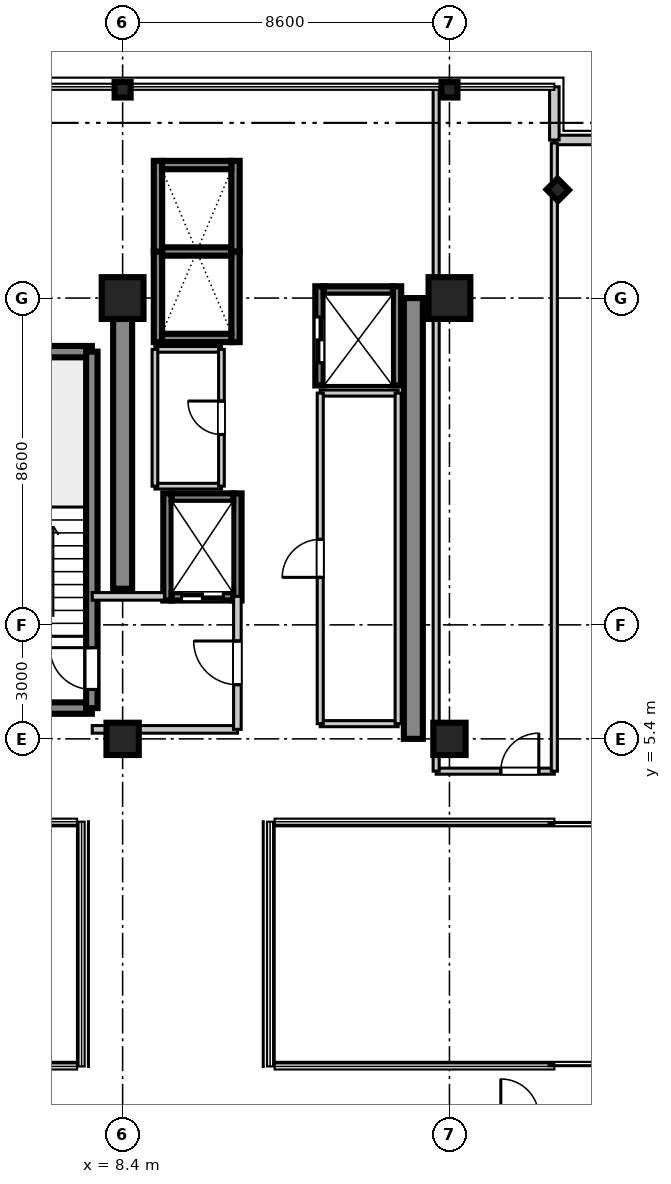
"""IFC4 building model, lengths in metres.
Left out: names, types, materials, properties, quantities, classifications, styles, units other than length and angle.
Written with IfcOpenShell. Run it as: python <this file> out.ifc"""

import sys

from ifc_helpers import new_model, si_unit, direction, frame, frame_2d, origin, origin_2d, place, context, subcontext, project, spatial, rectangle, i_section, extrude, source, transform, mapped, element, fill, save


model = new_model("IFC4")
c1 = context("Model", 3, precision=1e-05, world=origin(), true_north=direction((0.0, 1.0)))
c2 = subcontext(c1, "Body", "Model", "MODEL_VIEW")
j1 = project(units=[si_unit("LENGTHUNIT", "METRE"), si_unit("PLANEANGLEUNIT", "RADIAN")], contexts=[c1])
p1 = place(None, origin())
s1 = spatial("IfcSite", under=j1, at=p1, CompositionType="ELEMENT")
p2 = place(p1, origin())
s2 = spatial("IfcBuilding", under=s1, at=p2, CompositionType="ELEMENT")
p3 = place(p2, frame((0.0, 0.0, 170.9)))
s3 = spatial("IfcBuildingStorey", under=s2, at=p3, CompositionType="ELEMENT", Elevation=170.9)
m1 = source(origin(), c2, "Body", "SweptSolid", [
    extrude(rectangle(XDim=0.85, YDim=0.85, at=origin_2d()), origin(), (0.0, 0.0, 1.0), 3.605),
])
p4 = place(p3, frame((8.4, 5.4, 0.0), z_axis=(0.0, 0.0, 1.0), x_axis=(1.0, 0.0, 0.0)))
e1 = element("IfcColumn", 1, at=p4, inside=s3, PredefinedType="PILASTER", context=c2, shape_type="MappedRepresentation", body=[
    mapped(m1, transform((0.0, 0.0, 0.0), scale=1.0)),
])
m2 = source(origin(), c2, "Body", "SweptSolid", [
    extrude(rectangle(XDim=1.1, YDim=1.1, at=origin_2d()), origin(), (0.0, 0.0, 1.0), 3.605),
])
p5 = place(p3, frame((8.4, 17.0, 0.0), z_axis=(0.0, 0.0, 1.0), x_axis=(1.0, 0.0, 0.0)))
e2 = element("IfcColumn", 2, at=p5, inside=s3, PredefinedType="COLUMN", context=c2, shape_type="MappedRepresentation", body=[
    mapped(m2, transform((0.0, 0.0, 0.0), scale=1.0)),
])
p6 = place(p3, frame((17.0, 5.4, 0.0), z_axis=(0.0, 0.0, 1.0), x_axis=(1.0, 0.0, 0.0)))
e3 = element("IfcColumn", 3, at=p6, inside=s3, PredefinedType="PILASTER", context=c2, shape_type="MappedRepresentation", body=[
    mapped(m1, transform((0.0, 0.0, 0.0), scale=1.0)),
])
p7 = place(p3, frame((17.0, 17.0, 0.0), z_axis=(0.0, 0.0, 1.0), x_axis=(1.0, 0.0, 0.0)))
e4 = element("IfcColumn", 4, at=p7, inside=s3, PredefinedType="COLUMN", context=c2, shape_type="MappedRepresentation", body=[
    mapped(m2, transform((0.0, 0.0, 0.0), scale=1.0)),
])
m3 = source(origin(), c2, "Body", "SweptSolid", [
    extrude(i_section(OverallWidth=0.406, OverallDepth=0.422, WebThickness=0.019, FlangeThickness=0.03, at=origin_2d()), origin(), (0.0, 0.0, 1.0), 3.605),
])
for number, where, z_axis, x_axis in (
    (5, (8.4, 22.48, 0.0), (0.0, 0.0, 1.0), (0.0, 1.0, 0.0)),
    (6, (17.0, 22.48, 0.0), (0.0, 0.0, 1.0), (0.0, 1.0, 0.0)),
    (7, (19.85, 19.85, 0.0), (0.0, 0.0, 1.0), (0.707, 0.707, 0.0)),
):
    element("IfcColumn", number, at=place(p3, frame(where, z_axis=z_axis, x_axis=x_axis)), inside=s3, PredefinedType="COLUMN", context=c2, shape_type="MappedRepresentation", body=[
        mapped(m3, transform((0.0, 0.0, 0.0), scale=1.0)),
    ])
m4 = source(origin(), c2, "Body", "SweptSolid", [
    extrude(rectangle(XDim=7.65, YDim=0.5, at=frame_2d((3.825, 0.0))), origin(), (0.0, 0.0, 1.0), 3.39),
])
p8 = place(p3, frame((8.4, 9.35, 0.0), z_axis=(0.0, 0.0, 1.0), x_axis=(0.0, 1.0, 0.0)))
e8 = element("IfcWall", 8, at=p8, inside=s3, PredefinedType="SHEAR", context=c2, shape_type="MappedRepresentation", body=[
    mapped(m4, transform((0.0, 0.0, 0.0), scale=1.0)),
])
m5 = source(origin(), c2, "Body", "SweptSolid", [
    extrude(rectangle(XDim=11.6, YDim=0.5, at=frame_2d((5.8, 0.0))), origin(), (0.0, 0.0, 1.0), 3.39),
])
p9 = place(p3, frame((16.05, 5.4, 0.0), z_axis=(0.0, 0.0, 1.0), x_axis=(0.0, 1.0, 0.0)))
e9 = element("IfcWall", 9, at=p9, inside=s3, PredefinedType="SHEAR", context=c2, shape_type="MappedRepresentation", body=[
    mapped(m5, transform((0.0, 0.0, 0.0), scale=1.0)),
])
m6 = source(origin(), c2, "Body", "SweptSolid", [
    extrude(rectangle(XDim=3.98, YDim=0.3, at=frame_2d((1.99, 0.0))), origin(), (0.0, 0.0, 1.0), 3.39),
])
for number, where, z_axis, x_axis in (
    (10, (3.61, 6.21, 0.0), (0.0, 0.0, 1.0), (1.0, 0.0, 0.0)),
    (11, (3.61, 15.59, 0.0), (0.0, 0.0, 1.0), (1.0, 0.0, 0.0)),
):
    element("IfcWall", number, at=place(p3, frame(where, z_axis=z_axis, x_axis=x_axis)), inside=s3, PredefinedType="SHEAR", context=c2, shape_type="MappedRepresentation", body=[
        mapped(m6, transform((0.0, 0.0, 0.0), scale=1.0)),
    ])
m7 = source(origin(), c2, "Body", "SweptSolid", [
    extrude(rectangle(XDim=9.38, YDim=0.3, at=frame_2d((4.69, 0.0))), origin(), (0.0, 0.0, 1.0), 3.39),
])
p10 = place(p3, frame((7.59, 6.21, 0.0), z_axis=(0.0, 0.0, 1.0), x_axis=(0.0, 1.0, 0.0)))
e12 = element("IfcWall", 12, at=p10, inside=s3, PredefinedType="SHEAR", context=c2, shape_type="MappedRepresentation", body=[
    mapped(m7, transform((0.0, 0.0, 0.0), scale=1.0)),
])
p11 = place(p10, frame((0.49, 0.0, 0.0)))
e13 = element("IfcOpeningElement", 13, at=p11, cuts=e12, PredefinedType="OPENING", context=c2, shape_type="SweptSolid", body=[
    extrude(rectangle(XDim=1.1, YDim=2.15, at=frame_2d((0.55, 1.075))), frame((0.0, 0.16, 0.0), z_axis=(0.0, -1.0, 0.0), x_axis=(1.0, 0.0, 0.0)), (0.0, 0.0, 1.0), 0.32),
])
m8 = source(origin(), c2, "Body", "SweptSolid", [
    extrude(rectangle(XDim=2.385, YDim=0.22, at=frame_2d((1.192, 0.0))), origin(), (0.0, 0.0, 1.0), 3.39),
])
for number, where, z_axis, x_axis in (
    (14, (9.33, 15.84, 0.0), (0.0, 0.0, 1.0), (0.0, 1.0, 0.0)),
    (15, (11.37, 15.84, 0.0), (0.0, 0.0, 1.0), (0.0, 1.0, 0.0)),
):
    element("IfcWall", number, at=place(p3, frame(where, z_axis=z_axis, x_axis=x_axis)), inside=s3, PredefinedType="SHEAR", context=c2, shape_type="MappedRepresentation", body=[
        mapped(m8, transform((0.0, 0.0, 0.0), scale=1.0)),
    ])
m9 = source(origin(), c2, "Body", "SweptSolid", [
    extrude(rectangle(XDim=1.82, YDim=0.22, at=frame_2d((0.91, 0.0))), origin(), (0.0, 0.0, 1.0), 3.39),
])
p12 = place(p3, frame((9.44, 15.95, 0.0), z_axis=(0.0, 0.0, 1.0), x_axis=(1.0, 0.0, 0.0)))
e16 = element("IfcWall", 16, at=p12, inside=s3, PredefinedType="SHEAR", context=c2, shape_type="MappedRepresentation", body=[
    mapped(m9, transform((0.0, 0.0, 0.0), scale=1.0)),
])
m10 = source(origin(), c2, "Body", "SweptSolid", [
    extrude(rectangle(XDim=1.82, YDim=0.22, at=frame_2d((0.91, 0.0))), origin(), (0.0, 0.0, 1.0), 3.65),
])
p13 = place(p3, frame((9.44, 18.225, 0.0), z_axis=(0.0, 0.0, 1.0), x_axis=(1.0, 0.0, 0.0)))
e17 = element("IfcWall", 17, at=p13, inside=s3, PredefinedType="SHEAR", context=c2, shape_type="MappedRepresentation", body=[
    mapped(m10, transform((0.0, 0.0, 0.0), scale=1.0)),
])
for number, where, z_axis, x_axis in (
    (18, (9.33, 18.225, 0.0), (0.0, 0.0, 1.0), (0.0, 1.0, 0.0)),
    (19, (11.37, 18.225, 0.0), (0.0, 0.0, 1.0), (0.0, 1.0, 0.0)),
):
    element("IfcWall", number, at=place(p3, frame(where, z_axis=z_axis, x_axis=x_axis)), inside=s3, PredefinedType="SHEAR", context=c2, shape_type="MappedRepresentation", body=[
        mapped(m8, transform((0.0, 0.0, 0.0), scale=1.0)),
    ])
p14 = place(p3, frame((9.44, 20.5, 0.0), z_axis=(0.0, 0.0, 1.0), x_axis=(1.0, 0.0, 0.0)))
e20 = element("IfcWall", 20, at=p14, inside=s3, PredefinedType="SHEAR", context=c2, shape_type="MappedRepresentation", body=[
    mapped(m9, transform((0.0, 0.0, 0.0), scale=1.0)),
])
m11 = source(origin(), c2, "Body", "SweptSolid", [
    extrude(rectangle(XDim=2.82, YDim=0.22, at=frame_2d((1.41, 0.0))), origin(), (0.0, 0.0, 1.0), 3.39),
])
for number, where, z_axis, x_axis in (
    (21, (9.58, 9.04, 0.0), (0.0, 0.0, 1.0), (0.0, 1.0, 0.0)),
    (22, (11.42, 9.04, 0.0), (0.0, 0.0, 1.0), (0.0, 1.0, 0.0)),
):
    element("IfcWall", number, at=place(p3, frame(where, z_axis=z_axis, x_axis=x_axis)), inside=s3, PredefinedType="SHEAR", context=c2, shape_type="MappedRepresentation", body=[
        mapped(m11, transform((0.0, 0.0, 0.0), scale=1.0)),
    ])
m12 = source(origin(), c2, "Body", "SweptSolid", [
    extrude(rectangle(XDim=1.62, YDim=0.22, at=frame_2d((0.81, 0.0))), origin(), (0.0, 0.0, 1.0), 3.39),
])
p15 = place(p3, frame((9.69, 9.15, 0.0), z_axis=(0.0, 0.0, 1.0), x_axis=(1.0, 0.0, 0.0)))
e23 = element("IfcWall", 23, at=p15, inside=s3, PredefinedType="SHEAR", context=c2, shape_type="MappedRepresentation", body=[
    mapped(m12, transform((0.0, 0.0, 0.0), scale=1.0)),
])
p16 = place(p15, frame((0.26, 0.0, 0.0)))
e24 = element("IfcOpeningElement", 24, at=p16, cuts=e23, PredefinedType="OPENING", context=c2, shape_type="SweptSolid", body=[
    extrude(rectangle(XDim=1.1, YDim=2.2, at=frame_2d((0.55, 1.1))), frame((0.0, 0.12, 0.0), z_axis=(0.0, -1.0, 0.0), x_axis=(1.0, 0.0, 0.0)), (0.0, 0.0, 1.0), 0.24),
])
p17 = place(p3, frame((9.69, 11.75, 0.0), z_axis=(0.0, 0.0, 1.0), x_axis=(1.0, 0.0, 0.0)))
e25 = element("IfcWall", 25, at=p17, inside=s3, PredefinedType="SHEAR", context=c2, shape_type="MappedRepresentation", body=[
    mapped(m12, transform((0.0, 0.0, 0.0), scale=1.0)),
])
m13 = source(origin(), c2, "Body", "SweptSolid", [
    extrude(rectangle(XDim=2.61, YDim=0.22, at=frame_2d((1.305, 0.0))), origin(), (0.0, 0.0, 1.0), 3.39),
])
p18 = place(p3, frame((13.58, 14.7, 0.0), z_axis=(0.0, 0.0, 1.0), x_axis=(0.0, 1.0, 0.0)))
e26 = element("IfcWall", 26, at=p18, inside=s3, PredefinedType="SHEAR", context=c2, shape_type="MappedRepresentation", body=[
    mapped(m13, transform((0.0, 0.0, 0.0), scale=1.0)),
])
p19 = place(p18, frame((0.6, 0.0, 0.0)))
e27 = element("IfcOpeningElement", 27, at=p19, cuts=e26, PredefinedType="OPENING", context=c2, shape_type="SweptSolid", body=[
    extrude(rectangle(XDim=1.2, YDim=2.2, at=frame_2d((0.6, 1.1))), frame((0.0, 0.12, 0.0), z_axis=(0.0, -1.0, 0.0), x_axis=(1.0, 0.0, 0.0)), (0.0, 0.0, 1.0), 0.24),
])
p20 = place(p3, frame((15.62, 14.7, 0.0), z_axis=(0.0, 0.0, 1.0), x_axis=(0.0, 1.0, 0.0)))
e28 = element("IfcWall", 28, at=p20, inside=s3, PredefinedType="SHEAR", context=c2, shape_type="MappedRepresentation", body=[
    mapped(m13, transform((0.0, 0.0, 0.0), scale=1.0)),
])
p21 = place(p3, frame((13.69, 17.2, 0.0), z_axis=(0.0, 0.0, 1.0), x_axis=(1.0, 0.0, 0.0)))
e29 = element("IfcWall", 29, at=p21, inside=s3, PredefinedType="SHEAR", context=c2, shape_type="MappedRepresentation", body=[
    mapped(m9, transform((0.0, 0.0, 0.0), scale=1.0)),
])
m14 = source(origin(), c2, "Body", "SweptSolid", [
    extrude(rectangle(XDim=1.4, YDim=0.25, at=frame_2d((0.7, 0.0))), origin(), (0.0, 0.0, 1.0), 3.39),
])
p22 = place(p3, frame((19.76, 21.16, 0.0), z_axis=(0.0, 0.0, 1.0), x_axis=(1.0, 0.0, 0.0)))
e30 = element("IfcWall", 30, at=p22, inside=s3, PredefinedType="STANDARD", context=c2, shape_type="MappedRepresentation", body=[
    mapped(m14, transform((0.0, 0.0, 0.0), scale=1.0)),
])
m15 = source(origin(), c2, "Body", "SweptSolid", [
    extrude(rectangle(XDim=1.4, YDim=0.25, at=frame_2d((0.7, 0.0))), origin(), (0.0, 0.0, 1.0), 3.39),
])
p23 = place(p3, frame((19.76, 21.16, 0.0), z_axis=(0.0, 0.0, 1.0), x_axis=(0.0, 1.0, 0.0)))
e31 = element("IfcWall", 31, at=p23, inside=s3, PredefinedType="STANDARD", context=c2, shape_type="MappedRepresentation", body=[
    mapped(m15, transform((0.0, 0.0, 0.0), scale=1.0)),
])
m16 = source(origin(), c2, "Body", "SweptSolid", [
    extrude(rectangle(XDim=3.82, YDim=0.2, at=frame_2d((1.91, 0.0))), origin(), (0.0, 0.0, 1.0), 2.73),
])
p24 = place(p3, frame((7.6, 5.65, 0.0), z_axis=(0.0, 0.0, 1.0), x_axis=(1.0, 0.0, 0.0)))
e32 = element("IfcWall", 32, at=p24, inside=s3, PredefinedType="PARTITIONING", context=c2, shape_type="MappedRepresentation", body=[
    mapped(m16, transform((0.0, 0.0, 0.0), scale=1.0)),
])
m17 = source(origin(), c2, "Body", "SweptSolid", [
    extrude(rectangle(XDim=1.9, YDim=0.2, at=frame_2d((0.95, 0.0))), origin(), (0.0, 0.0, 1.0), 2.73),
])
p25 = place(p3, frame((7.6, 9.15, 0.0), z_axis=(0.0, 0.0, 1.0), x_axis=(1.0, 0.0, 0.0)))
e33 = element("IfcWall", 33, at=p25, inside=s3, PredefinedType="PARTITIONING", context=c2, shape_type="MappedRepresentation", body=[
    mapped(m17, transform((0.0, 0.0, 0.0), scale=1.0)),
])
m18 = source(origin(), c2, "Body", "SweptSolid", [
    extrude(rectangle(XDim=3.5, YDim=0.2, at=frame_2d((1.75, 0.0))), origin(), (0.0, 0.0, 1.0), 2.73),
])
p26 = place(p3, frame((11.42, 5.65, 0.0), z_axis=(0.0, 0.0, 1.0), x_axis=(0.0, 1.0, 0.0)))
e34 = element("IfcWall", 34, at=p26, inside=s3, PredefinedType="PARTITIONING", context=c2, shape_type="MappedRepresentation", body=[
    mapped(m18, transform((0.0, 0.0, 0.0), scale=1.0)),
])
p27 = place(p26, frame((1.175, 0.0, 0.0)))
e35 = element("IfcOpeningElement", 35, at=p27, cuts=e34, PredefinedType="OPENING", context=c2, shape_type="SweptSolid", body=[
    extrude(rectangle(XDim=1.15, YDim=2.15, at=frame_2d((0.575, 1.075))), frame((0.0, 0.11, 0.0), z_axis=(0.0, -1.0, 0.0), x_axis=(1.0, 0.0, 0.0)), (0.0, 0.0, 1.0), 0.22),
])
m19 = source(origin(), c2, "Body", "SweptSolid", [
    extrude(rectangle(XDim=1.75, YDim=0.15, at=frame_2d((0.875, 0.0))), origin(), (0.0, 0.0, 1.0), 2.73),
])
for number, where, z_axis, x_axis in (
    (36, (9.25, 12.05, 0.0), (0.0, 0.0, 1.0), (1.0, 0.0, 0.0)),
    (37, (9.25, 15.65, 0.0), (0.0, 0.0, 1.0), (1.0, 0.0, 0.0)),
):
    element("IfcWall", number, at=place(p3, frame(where, z_axis=z_axis, x_axis=x_axis)), inside=s3, PredefinedType="PARTITIONING", context=c2, shape_type="MappedRepresentation", body=[
        mapped(m19, transform((0.0, 0.0, 0.0), scale=1.0)),
    ])
m20 = source(origin(), c2, "Body", "SweptSolid", [
    extrude(rectangle(XDim=3.6, YDim=0.15, at=frame_2d((1.8, 0.0))), origin(), (0.0, 0.0, 1.0), 2.73),
])
p28 = place(p3, frame((9.25, 12.05, 0.0), z_axis=(0.0, 0.0, 1.0), x_axis=(0.0, 1.0, 0.0)))
e38 = element("IfcWall", 38, at=p28, inside=s3, PredefinedType="PARTITIONING", context=c2, shape_type="MappedRepresentation", body=[
    mapped(m20, transform((0.0, 0.0, 0.0), scale=1.0)),
])
p29 = place(p3, frame((11.0, 12.05, 0.0), z_axis=(0.0, 0.0, 1.0), x_axis=(0.0, 1.0, 0.0)))
e39 = element("IfcWall", 39, at=p29, inside=s3, PredefinedType="PARTITIONING", context=c2, shape_type="MappedRepresentation", body=[
    mapped(m20, transform((0.0, 0.0, 0.0), scale=1.0)),
])
p30 = place(p29, frame((1.36, 0.0, 0.0)))
e40 = element("IfcOpeningElement", 40, at=p30, cuts=e39, PredefinedType="OPENING", context=c2, shape_type="SweptSolid", body=[
    extrude(rectangle(XDim=0.88, YDim=2.1, at=frame_2d((0.44, 1.05))), frame((0.0, 0.085, 0.0), z_axis=(0.0, -1.0, 0.0), x_axis=(1.0, 0.0, 0.0)), (0.0, 0.0, 1.0), 0.17),
])
m21 = source(origin(), c2, "Body", "SweptSolid", [
    extrude(rectangle(XDim=2.05, YDim=0.16, at=frame_2d((1.025, 0.0))), origin(), (0.0, 0.0, 1.0), 2.73),
])
for number, where, z_axis, x_axis in (
    (41, (13.6, 5.8, 0.0), (0.0, 0.0, 1.0), (1.0, 0.0, 0.0)),
    (42, (13.6, 14.5, 0.0), (0.0, 0.0, 1.0), (1.0, 0.0, 0.0)),
):
    element("IfcWall", number, at=place(p3, frame(where, z_axis=z_axis, x_axis=x_axis)), inside=s3, PredefinedType="PARTITIONING", context=c2, shape_type="MappedRepresentation", body=[
        mapped(m21, transform((0.0, 0.0, 0.0), scale=1.0)),
    ])
m22 = source(origin(), c2, "Body", "SweptSolid", [
    extrude(rectangle(XDim=8.7, YDim=0.16, at=frame_2d((4.35, 0.0))), origin(), (0.0, 0.0, 1.0), 2.73),
])
p31 = place(p3, frame((13.6, 5.8, 0.0), z_axis=(0.0, 0.0, 1.0), x_axis=(0.0, 1.0, 0.0)))
e43 = element("IfcWall", 43, at=p31, inside=s3, PredefinedType="PARTITIONING", context=c2, shape_type="MappedRepresentation", body=[
    mapped(m22, transform((0.0, 0.0, 0.0), scale=1.0)),
])
p32 = place(p31, frame((3.85, 0.0, 0.0)))
e44 = element("IfcOpeningElement", 44, at=p32, cuts=e43, PredefinedType="OPENING", context=c2, shape_type="SweptSolid", body=[
    extrude(rectangle(XDim=1.0, YDim=2.1, at=frame_2d((0.5, 1.05))), frame((0.0, 0.09, 0.0), z_axis=(0.0, -1.0, 0.0), x_axis=(1.0, 0.0, 0.0)), (0.0, 0.0, 1.0), 0.18),
])
p33 = place(p3, frame((15.65, 5.8, 0.0), z_axis=(0.0, 0.0, 1.0), x_axis=(0.0, 1.0, 0.0)))
e45 = element("IfcWall", 45, at=p33, inside=s3, PredefinedType="PARTITIONING", context=c2, shape_type="MappedRepresentation", body=[
    mapped(m22, transform((0.0, 0.0, 0.0), scale=1.0)),
])
m23 = source(origin(), c2, "Body", "SweptSolid", [
    extrude(rectangle(XDim=3.11, YDim=0.16, at=frame_2d((1.555, 0.0))), origin(), (0.0, 0.0, 1.0), 2.73),
])
p34 = place(p3, frame((16.65, 4.55, 0.0), z_axis=(0.0, 0.0, 1.0), x_axis=(1.0, 0.0, 0.0)))
e46 = element("IfcWall", 46, at=p34, inside=s3, PredefinedType="PARTITIONING", context=c2, shape_type="MappedRepresentation", body=[
    mapped(m23, transform((0.0, 0.0, 0.0), scale=1.0)),
])
p35 = place(p34, frame((1.701, 0.0, 0.0)))
e47 = element("IfcOpeningElement", 47, at=p35, cuts=e46, PredefinedType="OPENING", context=c2, shape_type="SweptSolid", body=[
    extrude(rectangle(XDim=1.0, YDim=2.1, at=frame_2d((0.5, 1.05))), frame((0.0, 0.09, 0.0), z_axis=(0.0, -1.0, 0.0), x_axis=(1.0, 0.0, 0.0)), (0.0, 0.0, 1.0), 0.18),
])
m24 = source(origin(), c2, "Body", "SweptSolid", [
    extrude(rectangle(XDim=17.95, YDim=0.16, at=frame_2d((8.975, 0.0))), origin(), (0.0, 0.0, 1.0), 2.73),
])
p36 = place(p3, frame((16.65, 4.55, 0.0), z_axis=(0.0, 0.0, 1.0), x_axis=(0.0, 1.0, 0.0)))
e48 = element("IfcWall", 48, at=p36, inside=s3, PredefinedType="PARTITIONING", context=c2, shape_type="MappedRepresentation", body=[
    mapped(m24, transform((0.0, 0.0, 0.0), scale=1.0)),
])
m25 = source(origin(), c2, "Body", "SweptSolid", [
    extrude(rectangle(XDim=16.53, YDim=0.16, at=frame_2d((8.265, 0.0))), origin(), (0.0, 0.0, 1.0), 2.73),
])
p37 = place(p3, frame((19.76, 4.55, 0.0), z_axis=(0.0, 0.0, 1.0), x_axis=(0.0, 1.0, 0.0)))
e49 = element("IfcWall", 49, at=p37, inside=s3, PredefinedType="PARTITIONING", context=c2, shape_type="MappedRepresentation", body=[
    mapped(m25, transform((0.0, 0.0, 0.0), scale=1.0)),
])
m26 = source(origin(), c2, "Body", "SweptSolid", [
    extrude(rectangle(XDim=1.1, YDim=2.15, at=frame_2d((0.55, 1.075))), frame((0.0, 0.025, 0.0), z_axis=(0.0, -1.0, 0.0), x_axis=(1.0, 0.0, 0.0)), (0.0, 0.0, 1.0), 0.05),
])
p38 = place(p11, origin())
e50 = element("IfcDoor", 50, at=p38, inside=s3, OperationType="SINGLE_SWING_RIGHT", PredefinedType="DOOR", context=c2, shape_type="MappedRepresentation", body=[
    mapped(m26, transform((0.0, 0.0, 0.0), scale=1.0)),
])
fill(e13, e50)
m27 = source(origin(), c2, "Body", "SweptSolid", [
    extrude(rectangle(XDim=1.1, YDim=2.2, at=frame_2d((0.55, 1.1))), frame((0.0, 0.025, 0.0), z_axis=(0.0, -1.0, 0.0), x_axis=(1.0, 0.0, 0.0)), (0.0, 0.0, 1.0), 0.05),
])
p39 = place(p16, frame((1.1, 0.0, 0.0), z_axis=(0.0, 0.0, 1.0), x_axis=(-1.0, 0.0, 0.0)))
e51 = element("IfcDoor", 51, at=p39, inside=s3, OperationType="DOUBLE_DOOR_SLIDING", PredefinedType="DOOR", context=c2, shape_type="MappedRepresentation", body=[
    mapped(m27, transform((0.0, 0.0, 0.0), scale=1.0)),
])
fill(e24, e51)
m28 = source(origin(), c2, "Body", "SweptSolid", [
    extrude(rectangle(XDim=1.2, YDim=2.2, at=frame_2d((0.6, 1.1))), frame((0.0, 0.025, 0.0), z_axis=(0.0, -1.0, 0.0), x_axis=(1.0, 0.0, 0.0)), (0.0, 0.0, 1.0), 0.05),
])
p40 = place(p19, origin())
e52 = element("IfcDoor", 52, at=p40, inside=s3, OperationType="DOUBLE_DOOR_SLIDING", PredefinedType="DOOR", context=c2, shape_type="MappedRepresentation", body=[
    mapped(m28, transform((0.0, 0.0, 0.0), scale=1.0)),
])
fill(e27, e52)
m29 = source(origin(), c2, "Body", "SweptSolid", [
    extrude(rectangle(XDim=1.15, YDim=2.15, at=frame_2d((0.575, 1.075))), frame((0.0, 0.025, 0.0), z_axis=(0.0, -1.0, 0.0), x_axis=(1.0, 0.0, 0.0)), (0.0, 0.0, 1.0), 0.05),
])
p41 = place(p27, frame((1.15, 0.0, 0.0), z_axis=(0.0, 0.0, 1.0), x_axis=(-1.0, 0.0, 0.0)))
e53 = element("IfcDoor", 53, at=p41, inside=s3, OperationType="SINGLE_SWING_RIGHT", PredefinedType="DOOR", context=c2, shape_type="MappedRepresentation", body=[
    mapped(m29, transform((0.0, 0.0, 0.0), scale=1.0)),
])
fill(e35, e53)
m30 = source(origin(), c2, "Body", "SweptSolid", [
    extrude(rectangle(XDim=0.88, YDim=2.1, at=frame_2d((0.44, 1.05))), frame((0.0, 0.025, 0.0), z_axis=(0.0, -1.0, 0.0), x_axis=(1.0, 0.0, 0.0)), (0.0, 0.0, 1.0), 0.05),
])
p42 = place(p30, origin())
e54 = element("IfcDoor", 54, at=p42, inside=s3, OperationType="SINGLE_SWING_RIGHT", PredefinedType="DOOR", context=c2, shape_type="MappedRepresentation", body=[
    mapped(m30, transform((0.0, 0.0, 0.0), scale=1.0)),
])
fill(e40, e54)
m31 = source(origin(), c2, "Body", "SweptSolid", [
    extrude(rectangle(XDim=1.0, YDim=2.1, at=frame_2d((0.5, 1.05))), frame((0.0, 0.025, 0.0), z_axis=(0.0, -1.0, 0.0), x_axis=(1.0, 0.0, 0.0)), (0.0, 0.0, 1.0), 0.05),
])
p43 = place(p32, frame((1.0, 0.0, 0.0), z_axis=(0.0, 0.0, 1.0), x_axis=(-1.0, 0.0, 0.0)))
e55 = element("IfcDoor", 55, at=p43, inside=s3, OperationType="SINGLE_SWING_LEFT", PredefinedType="DOOR", context=c2, shape_type="MappedRepresentation", body=[
    mapped(m31, transform((0.0, 0.0, 0.0), scale=1.0)),
])
fill(e44, e55)
p44 = place(p35, origin())
e56 = element("IfcDoor", 56, at=p44, inside=s3, OperationType="SINGLE_SWING_RIGHT", PredefinedType="DOOR", context=c2, shape_type="MappedRepresentation", body=[
    mapped(m31, transform((0.0, 0.0, 0.0), scale=1.0)),
])
fill(e47, e56)
save(model, sys.argv[1])
